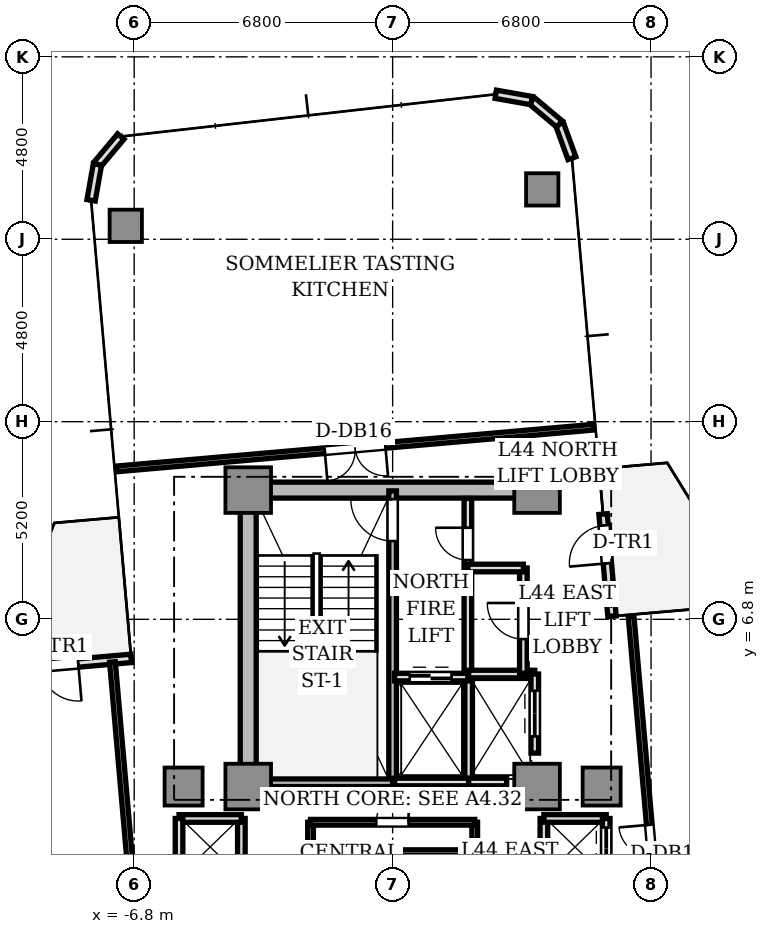
"""IFC4 building model, lengths in metres.
Left out: names, types, materials, properties, quantities, classifications, styles, units other than length and angle.
Written with IfcOpenShell. Run it as: python <this file> out.ifc"""

import sys

from ifc_helpers import new_model, si_unit, direction, frame, frame_2d, origin, origin_2d, place, context, subcontext, project, spatial, rectangle, extrude, source, transform, mapped, element, fill, save


model = new_model("IFC4")
c1 = context("Model", 3, precision=1e-05, world=origin(), true_north=direction((0.0, 1.0)))
c2 = subcontext(c1, "Body", "Model", "MODEL_VIEW")
j1 = project(units=[si_unit("LENGTHUNIT", "METRE"), si_unit("PLANEANGLEUNIT", "RADIAN")], contexts=[c1])
p1 = place(None, origin())
s1 = spatial("IfcSite", under=j1, at=p1, CompositionType="ELEMENT")
p2 = place(p1, origin())
s2 = spatial("IfcBuilding", under=s1, at=p2, CompositionType="ELEMENT")
p3 = place(p2, frame((0.0, 0.0, 160.65)))
s3 = spatial("IfcBuildingStorey", under=s2, at=p3, CompositionType="ELEMENT", Elevation=160.65)
p4 = place(p3, frame((-3.55, 10.2, 0.0), z_axis=(0.0, 0.0, 1.0), x_axis=(1.0, 0.0, 0.0)))
e1 = element("IfcWall", 1, at=p4, inside=s3, PredefinedType="SHEAR", context=c2, shape_type="SweptSolid", body=[
    extrude(rectangle(XDim=7.1, YDim=0.42, at=frame_2d((3.55, 0.0))), origin(), (0.0, 0.0, 1.0), 3.11),
])
p5 = place(p3, frame((-3.8, 2.85, 0.0), z_axis=(0.0, 0.0, 1.0), x_axis=(0.0, 1.0, 0.0)))
e2 = element("IfcWall", 2, at=p5, inside=s3, PredefinedType="SHEAR", context=c2, shape_type="SweptSolid", body=[
    extrude(rectangle(XDim=6.9, YDim=0.42, at=frame_2d((3.45, 0.0))), origin(), (0.0, 0.0, 1.0), 3.11),
])
m1 = source(origin(), c2, "Body", "SweptSolid", [
    extrude(rectangle(XDim=1.2, YDim=1.2, at=origin_2d()), origin(), (0.0, 0.0, 1.0), 3.11),
])
for number, where, z_axis, x_axis in (
    (3, (-3.8, 2.4, 0.0), (0.0, 0.0, 1.0), (1.0, 0.0, 0.0)),
    (4, (3.8, 2.4, 0.0), (0.0, 0.0, 1.0), (1.0, 0.0, 0.0)),
    (5, (-3.8, 10.2, 0.0), (0.0, 0.0, 1.0), (1.0, 0.0, 0.0)),
    (6, (3.8, 10.2, 0.0), (0.0, 0.0, 1.0), (1.0, 0.0, 0.0)),
):
    element("IfcColumn", number, at=place(p3, frame(where, z_axis=z_axis, x_axis=x_axis)), inside=s3, PredefinedType="COLUMN", context=c2, shape_type="MappedRepresentation", body=[
        mapped(m1, transform((0.0, 0.0, 0.0), scale=1.0)),
    ])
m2 = source(origin(), c2, "Body", "SweptSolid", [
    extrude(rectangle(XDim=1.0, YDim=1.0, at=origin_2d()), origin(), (0.0, 0.0, 1.0), 3.11),
])
for number, where, z_axis, x_axis in (
    (7, (5.5, 2.4, 0.0), (0.0, 0.0, 1.0), (1.0, 0.0, 0.0)),
    (8, (-5.5, 2.4, 0.0), (0.0, 0.0, 1.0), (1.0, 0.0, 0.0)),
):
    element("IfcColumn", number, at=place(p3, frame(where, z_axis=z_axis, x_axis=x_axis)), inside=s3, PredefinedType="COLUMN", context=c2, shape_type="MappedRepresentation", body=[
        mapped(m2, transform((0.0, 0.0, 0.0), scale=1.0)),
    ])
m3 = source(origin(), c2, "Body", "SweptSolid", [
    extrude(rectangle(XDim=0.85, YDim=0.85, at=origin_2d()), origin(), (0.0, 0.0, 1.0), 3.11),
])
for number, where, z_axis, x_axis in (
    (9, (3.936, 18.112, 0.0), (0.0, 0.0, 1.0), (1.0, 0.0, 0.0)),
    (10, (-7.022, 17.153, 0.0), (0.0, 0.0, 1.0), (1.0, 0.0, 0.0)),
):
    element("IfcColumn", number, at=place(p3, frame(where, z_axis=z_axis, x_axis=x_axis)), inside=s3, PredefinedType="COLUMN", context=c2, shape_type="MappedRepresentation", body=[
        mapped(m3, transform((0.0, 0.0, 0.0), scale=1.0)),
    ])
p6 = place(p3, frame((5.772, 6.879, 0.0), z_axis=(0.0, 0.0, 1.0), x_axis=(-0.087168071984, 0.996193619346, 0.0)))
e11 = element("IfcWall", 11, at=p6, inside=s3, PredefinedType="STANDARD", context=c2, shape_type="SweptSolid", body=[
    extrude(rectangle(XDim=2.7, YDim=0.22, at=frame_2d((1.35, 0.0))), origin(), (0.0, 0.0, 1.0), 3.11),
])
p7 = place(p6, frame((1.4, 0.0, 0.0)))
e12 = element("IfcOpeningElement", 12, at=p7, cuts=e11, PredefinedType="OPENING", context=c2, shape_type="SweptSolid", body=[
    extrude(rectangle(XDim=1.0, YDim=2.2, at=frame_2d((0.5, 1.1))), frame((0.0, 0.12, 0.0), z_axis=(0.0, -1.0, 0.0), x_axis=(1.0, 0.0, 0.0)), (0.0, 0.0, 1.0), 0.24),
])
p8 = place(p3, frame((4.718, 18.933, 0.0), z_axis=(0.0, 0.0, 1.0), x_axis=(-0.34188635151, 0.939741306239, 0.0)))
e13 = element("IfcWall", 13, at=p8, inside=s3, PredefinedType="STANDARD", context=c2, shape_type="SweptSolid", body=[
    extrude(rectangle(XDim=0.958, YDim=0.22, at=frame_2d((0.479, 0.0))), origin(), (0.0, 0.0, 1.0), 3.11),
])
for number, where, z_axis, x_axis in (
    (14, (4.39, 19.833, 0.0), (0.0, 0.0, 1.0), (-0.766, 0.643, 0.0)),
    (15, (3.657, 20.449, 0.0), (0.0, 0.0, 1.0), (-0.985, 0.174, 0.0)),
):
    element("IfcWall", number, at=place(p3, frame(where, z_axis=z_axis, x_axis=x_axis)), inside=s3, PredefinedType="STANDARD", context=c2, shape_type="SweptSolid", body=[
        extrude(rectangle(XDim=0.958, YDim=0.22, at=frame_2d((0.479, 0.0))), origin(), (0.0, 0.0, 1.0), 3.11),
    ])
for number, where, z_axis, x_axis in (
    (16, (-7.152, 19.503, 0.0), (0.0, 0.0, 1.0), (-0.643, -0.766, 0.0)),
    (17, (-7.768, 18.769, 0.0), (0.0, 0.0, 1.0), (-0.174, -0.985, 0.0)),
):
    element("IfcWall", number, at=place(p3, frame(where, z_axis=z_axis, x_axis=x_axis)), inside=s3, PredefinedType="STANDARD", context=c2, shape_type="SweptSolid", body=[
        extrude(rectangle(XDim=0.958, YDim=0.22, at=frame_2d((0.479, 0.0))), origin(), (0.0, 0.0, 1.0), 3.11),
    ])
p9 = place(p3, frame((-6.879, 5.772, 0.0), z_axis=(0.0, 0.0, 1.0), x_axis=(-0.996193619346, -0.087168071984, 0.0)))
e18 = element("IfcWall", 18, at=p9, inside=s3, PredefinedType="STANDARD", context=c2, shape_type="SweptSolid", body=[
    extrude(rectangle(XDim=2.7, YDim=0.22, at=frame_2d((1.35, 0.0))), origin(), (0.0, 0.0, 1.0), 3.11),
])
p10 = place(p9, frame((1.4, 0.0, 0.0)))
e19 = element("IfcOpeningElement", 19, at=p10, cuts=e18, PredefinedType="OPENING", context=c2, shape_type="SweptSolid", body=[
    extrude(rectangle(XDim=1.0, YDim=2.2, at=frame_2d((0.5, 1.1))), frame((0.0, 0.12, 0.0), z_axis=(0.0, -1.0, 0.0), x_axis=(1.0, 0.0, 0.0)), (0.0, 0.0, 1.0), 0.24),
])
p11 = place(p3, frame((0.0, 2.5, 0.0), z_axis=(0.0, 0.0, 1.0), x_axis=(0.0, 1.0, 0.0)))
e20 = element("IfcWall", 20, at=p11, inside=s3, PredefinedType="SOLIDWALL", context=c2, shape_type="SweptSolid", body=[
    extrude(rectangle(XDim=7.68, YDim=0.2, at=frame_2d((3.84, 0.0))), origin(), (0.0, 0.0, 1.0), 3.11),
])
p12 = place(p11, frame((6.36, 0.0, 0.0)))
e21 = element("IfcOpeningElement", 21, at=p12, cuts=e20, PredefinedType="OPENING", context=c2, shape_type="SweptSolid", body=[
    extrude(rectangle(XDim=1.1, YDim=2.15, at=frame_2d((0.55, 1.075))), frame((0.0, 0.11, 0.0), z_axis=(0.0, -1.0, 0.0), x_axis=(1.0, 0.0, 0.0)), (0.0, 0.0, 1.0), 0.22),
])
p13 = place(p3, frame((-3.72, 2.5, 0.0), z_axis=(0.0, 0.0, 1.0), x_axis=(1.0, 0.0, 0.0)))
e22 = element("IfcWall", 22, at=p13, inside=s3, PredefinedType="SOLIDWALL", context=c2, shape_type="SweptSolid", body=[
    extrude(rectangle(XDim=3.72, YDim=0.2, at=frame_2d((1.86, 0.0))), origin(), (0.0, 0.0, 1.0), 3.11),
])
p14 = place(p3, frame((1.98, 5.32, 0.0), z_axis=(0.0, 0.0, 1.0), x_axis=(0.0, 1.0, 0.0)))
e23 = element("IfcWall", 23, at=p14, inside=s3, PredefinedType="SOLIDWALL", context=c2, shape_type="SweptSolid", body=[
    extrude(rectangle(XDim=4.66, YDim=0.2, at=frame_2d((2.33, 0.0))), origin(), (0.0, 0.0, 1.0), 2.66),
])
p15 = place(p14, frame((3.04, 0.0, 0.0)))
e24 = element("IfcOpeningElement", 24, at=p15, cuts=e23, PredefinedType="OPENING", context=c2, shape_type="SweptSolid", body=[
    extrude(rectangle(XDim=0.85, YDim=2.1, at=frame_2d((0.425, 1.05))), frame((0.0, 0.11, 0.0), z_axis=(0.0, -1.0, 0.0), x_axis=(1.0, 0.0, 0.0)), (0.0, 0.0, 1.0), 0.22),
])
p16 = place(p3, frame((2.0, 2.5, 0.0), z_axis=(0.0, 0.0, 1.0), x_axis=(0.0, 1.0, 0.0)))
e25 = element("IfcWall", 25, at=p16, inside=s3, PredefinedType="SOLIDWALL", context=c2, shape_type="SweptSolid", body=[
    extrude(rectangle(XDim=2.78, YDim=0.2, at=frame_2d((1.39, 0.0))), origin(), (0.0, 0.0, 1.0), 2.66),
])
p17 = place(p3, frame((0.05, 2.52, 0.0), z_axis=(0.0, 0.0, 1.0), x_axis=(1.0, 0.0, 0.0)))
e26 = element("IfcWall", 26, at=p17, inside=s3, PredefinedType="SOLIDWALL", context=c2, shape_type="SweptSolid", body=[
    extrude(rectangle(XDim=1.95, YDim=0.2, at=frame_2d((0.975, 0.0))), origin(), (0.0, 0.0, 1.0), 2.66),
])
p18 = place(p3, frame((0.05, 5.28, 0.0), z_axis=(0.0, 0.0, 1.0), x_axis=(1.0, 0.0, 0.0)))
e27 = element("IfcWall", 27, at=p18, inside=s3, PredefinedType="SOLIDWALL", context=c2, shape_type="SweptSolid", body=[
    extrude(rectangle(XDim=1.93, YDim=0.2, at=frame_2d((0.965, 0.0))), origin(), (0.0, 0.0, 1.0), 2.66),
])
p19 = place(p18, frame((0.4, 0.0, 0.0)))
e28 = element("IfcOpeningElement", 28, at=p19, cuts=e27, PredefinedType="OPENING", context=c2, shape_type="SweptSolid", body=[
    extrude(rectangle(XDim=1.1, YDim=2.2, at=frame_2d((0.55, 1.1))), frame((0.0, 0.11, 0.0), z_axis=(0.0, -1.0, 0.0), x_axis=(1.0, 0.0, 0.0)), (0.0, 0.0, 1.0), 0.22),
])
p20 = place(p3, frame((2.0, 2.52, 0.0), z_axis=(0.0, 0.0, 1.0), x_axis=(1.0, 0.0, 0.0)))
e29 = element("IfcWall", 29, at=p20, inside=s3, PredefinedType="SOLIDWALL", context=c2, shape_type="SweptSolid", body=[
    extrude(rectangle(XDim=1.0, YDim=0.2, at=frame_2d((0.5, 0.0))), origin(), (0.0, 0.0, 1.0), 2.66),
])
p21 = place(p3, frame((2.0, 5.36, 0.0), z_axis=(0.0, 0.0, 1.0), x_axis=(1.0, 0.0, 0.0)))
e30 = element("IfcWall", 30, at=p21, inside=s3, PredefinedType="SOLIDWALL", context=c2, shape_type="SweptSolid", body=[
    extrude(rectangle(XDim=1.74, YDim=0.2, at=frame_2d((0.87, 0.0))), origin(), (0.0, 0.0, 1.0), 2.66),
])
p22 = place(p3, frame((3.74, 3.28, 0.0), z_axis=(0.0, 0.0, 1.0), x_axis=(0.0, 1.0, 0.0)))
e31 = element("IfcWall", 31, at=p22, inside=s3, PredefinedType="SOLIDWALL", context=c2, shape_type="SweptSolid", body=[
    extrude(rectangle(XDim=2.08, YDim=0.2, at=frame_2d((1.04, 0.0))), origin(), (0.0, 0.0, 1.0), 2.66),
])
p23 = place(p22, frame((0.44, 0.0, 0.0)))
e32 = element("IfcOpeningElement", 32, at=p23, cuts=e31, PredefinedType="OPENING", context=c2, shape_type="SweptSolid", body=[
    extrude(rectangle(XDim=1.2, YDim=2.2, at=frame_2d((0.6, 1.1))), frame((0.0, 0.11, 0.0), z_axis=(0.0, -1.0, 0.0), x_axis=(1.0, 0.0, 0.0)), (0.0, 0.0, 1.0), 0.22),
])
p24 = place(p3, frame((3.98, -1.56, 0.0), z_axis=(0.0, 0.0, 1.0), x_axis=(0.0, 1.0, 0.0)))
e33 = element("IfcWall", 33, at=p24, inside=s3, PredefinedType="SOLIDWALL", context=c2, shape_type="SweptSolid", body=[
    extrude(rectangle(XDim=3.12, YDim=0.2, at=frame_2d((1.56, 0.0))), origin(), (0.0, 0.0, 1.0), 2.28),
])
p25 = place(p3, frame((3.98, 1.56, 0.0), z_axis=(0.0, 0.0, 1.0), x_axis=(1.0, 0.0, 0.0)))
e34 = element("IfcWall", 34, at=p25, inside=s3, PredefinedType="SOLIDWALL", context=c2, shape_type="SweptSolid", body=[
    extrude(rectangle(XDim=1.64, YDim=0.2, at=frame_2d((0.82, 0.0))), origin(), (0.0, 0.0, 1.0), 2.66),
])
p26 = place(p3, frame((5.62, 0.0, 0.0), z_axis=(0.0, 0.0, 1.0), x_axis=(0.0, 1.0, 0.0)))
e35 = element("IfcWall", 35, at=p26, inside=s3, PredefinedType="SOLIDWALL", context=c2, shape_type="SweptSolid", body=[
    extrude(rectangle(XDim=1.56, YDim=0.2, at=frame_2d((0.78, 0.0))), origin(), (0.0, 0.0, 1.0), 2.66),
])
p27 = place(p26, frame((0.22, 0.0, 0.0)))
e36 = element("IfcOpeningElement", 36, at=p27, cuts=e35, PredefinedType="OPENING", context=c2, shape_type="SweptSolid", body=[
    extrude(rectangle(XDim=1.1, YDim=2.2, at=frame_2d((0.55, 1.1))), frame((0.0, 0.11, 0.0), z_axis=(0.0, -1.0, 0.0), x_axis=(1.0, 0.0, 0.0)), (0.0, 0.0, 1.0), 0.22),
])
p28 = place(p3, frame((-3.98, -1.56, 0.0), z_axis=(0.0, 0.0, 1.0), x_axis=(0.0, 1.0, 0.0)))
e37 = element("IfcWall", 37, at=p28, inside=s3, PredefinedType="SOLIDWALL", context=c2, shape_type="SweptSolid", body=[
    extrude(rectangle(XDim=3.12, YDim=0.2, at=frame_2d((1.56, 0.0))), origin(), (0.0, 0.0, 1.0), 2.28),
])
p29 = place(p3, frame((-5.62, 1.56, 0.0), z_axis=(0.0, 0.0, 1.0), x_axis=(1.0, 0.0, 0.0)))
e38 = element("IfcWall", 38, at=p29, inside=s3, PredefinedType="SOLIDWALL", context=c2, shape_type="SweptSolid", body=[
    extrude(rectangle(XDim=1.64, YDim=0.2, at=frame_2d((0.82, 0.0))), origin(), (0.0, 0.0, 1.0), 2.66),
])
p30 = place(p3, frame((-5.62, 0.0, 0.0), z_axis=(0.0, 0.0, 1.0), x_axis=(0.0, 1.0, 0.0)))
e39 = element("IfcWall", 39, at=p30, inside=s3, PredefinedType="SOLIDWALL", context=c2, shape_type="SweptSolid", body=[
    extrude(rectangle(XDim=1.56, YDim=0.2, at=frame_2d((0.78, 0.0))), origin(), (0.0, 0.0, 1.0), 2.66),
])
p31 = place(p3, frame((3.44, 5.38, 0.0), z_axis=(0.0, 0.0, 1.0), x_axis=(0.0, 1.0, 0.0)))
e40 = element("IfcWall", 40, at=p31, inside=s3, PredefinedType="SOLIDWALL", context=c2, shape_type="SweptSolid", body=[
    extrude(rectangle(XDim=2.77, YDim=0.2, at=frame_2d((1.385, 0.0))), origin(), (0.0, 0.0, 1.0), 2.66),
])
p32 = place(p31, frame((0.9, 0.0, 0.0)))
e41 = element("IfcOpeningElement", 41, at=p32, cuts=e40, PredefinedType="OPENING", context=c2, shape_type="SweptSolid", body=[
    extrude(rectangle(XDim=0.95, YDim=2.15, at=frame_2d((0.475, 1.075))), frame((0.0, 0.11, 0.0), z_axis=(0.0, -1.0, 0.0), x_axis=(1.0, 0.0, 0.0)), (0.0, 0.0, 1.0), 0.22),
])
p33 = place(p3, frame((1.98, 8.15, 0.0), z_axis=(0.0, 0.0, 1.0), x_axis=(1.0, 0.0, 0.0)))
e42 = element("IfcWall", 42, at=p33, inside=s3, PredefinedType="SOLIDWALL", context=c2, shape_type="SweptSolid", body=[
    extrude(rectangle(XDim=1.46, YDim=0.2, at=frame_2d((0.73, 0.0))), origin(), (0.0, 0.0, 1.0), 2.66),
])
p34 = place(p3, frame((2.16, -1.46, 0.0), z_axis=(0.0, 0.0, 1.0), x_axis=(0.0, 1.0, 0.0)))
e43 = element("IfcWall", 43, at=p34, inside=s3, PredefinedType="PARTITIONING", context=c2, shape_type="SweptSolid", body=[
    extrude(rectangle(XDim=2.92, YDim=0.15, at=frame_2d((1.46, 0.0))), origin(), (0.0, 0.0, 1.0), 2.66),
])
p35 = place(p34, frame((1.035, 0.0, 0.0)))
e44 = element("IfcOpeningElement", 44, at=p35, cuts=e43, PredefinedType="OPENING", context=c2, shape_type="SweptSolid", body=[
    extrude(rectangle(XDim=0.85, YDim=2.1, at=frame_2d((0.425, 1.05))), frame((0.0, 0.085, 0.0), z_axis=(0.0, -1.0, 0.0), x_axis=(1.0, 0.0, 0.0)), (0.0, 0.0, 1.0), 0.17),
])
p36 = place(p3, frame((-2.16, -1.46, 0.0), z_axis=(0.0, 0.0, 1.0), x_axis=(0.0, 1.0, 0.0)))
e45 = element("IfcWall", 45, at=p36, inside=s3, PredefinedType="PARTITIONING", context=c2, shape_type="SweptSolid", body=[
    extrude(rectangle(XDim=2.92, YDim=0.15, at=frame_2d((1.46, 0.0))), origin(), (0.0, 0.0, 1.0), 2.66),
])
p37 = place(p3, frame((-2.16, 1.46, 0.0), z_axis=(0.0, 0.0, 1.0), x_axis=(1.0, 0.0, 0.0)))
e46 = element("IfcWall", 46, at=p37, inside=s3, PredefinedType="PARTITIONING", context=c2, shape_type="SweptSolid", body=[
    extrude(rectangle(XDim=4.32, YDim=0.15, at=frame_2d((2.16, 0.0))), origin(), (0.0, 0.0, 1.0), 2.66),
])
p38 = place(p37, frame((1.73, 0.0, 0.0)))
e47 = element("IfcOpeningElement", 47, at=p38, cuts=e46, PredefinedType="OPENING", context=c2, shape_type="SweptSolid", body=[
    extrude(rectangle(XDim=0.85, YDim=2.1, at=frame_2d((0.425, 1.05))), frame((0.0, 0.085, 0.0), z_axis=(0.0, -1.0, 0.0), x_axis=(1.0, 0.0, 0.0)), (0.0, 0.0, 1.0), 0.17),
])
p39 = place(p3, frame((-2.16, 0.66, 0.0), z_axis=(0.0, 0.0, 1.0), x_axis=(1.0, 0.0, 0.0)))
e48 = element("IfcWall", 48, at=p39, inside=s3, PredefinedType="PARTITIONING", context=c2, shape_type="SweptSolid", body=[
    extrude(rectangle(XDim=4.32, YDim=0.15, at=frame_2d((2.16, 0.0))), origin(), (0.0, 0.0, 1.0), 2.66),
])
p40 = place(p3, frame((7.373, -5.679, 0.0), z_axis=(0.0, 0.0, 1.0), x_axis=(-0.087154691724, 0.996194790044, 0.0)))
e49 = element("IfcWall", 49, at=p40, inside=s3, PredefinedType="PARTITIONING", context=c2, shape_type="SweptSolid", body=[
    extrude(rectangle(XDim=12.6, YDim=0.15, at=frame_2d((6.3, 0.0))), origin(), (0.0, 0.0, 1.0), 2.66),
])
p41 = place(p40, frame((5.5, 0.0, 0.0)))
e50 = element("IfcOpeningElement", 50, at=p41, cuts=e49, PredefinedType="OPENING", context=c2, shape_type="SweptSolid", body=[
    extrude(rectangle(XDim=1.6, YDim=2.25, at=frame_2d((0.8, 1.125))), frame((0.0, 0.085, 0.0), z_axis=(0.0, -1.0, 0.0), x_axis=(1.0, 0.0, 0.0)), (0.0, 0.0, 1.0), 0.17),
])
p42 = place(p3, frame((5.287, 11.856, 0.0), z_axis=(0.0, 0.0, 1.0), x_axis=(-0.996194790044, -0.087154691724, 0.0)))
e51 = element("IfcWall", 51, at=p42, inside=s3, PredefinedType="PARTITIONING", context=c2, shape_type="SweptSolid", body=[
    extrude(rectangle(XDim=12.6, YDim=0.15, at=frame_2d((6.3, 0.0))), origin(), (0.0, 0.0, 1.0), 2.66),
])
p43 = place(p42, frame((5.5, 0.0, 0.0)))
e52 = element("IfcOpeningElement", 52, at=p43, cuts=e51, PredefinedType="OPENING", context=c2, shape_type="SweptSolid", body=[
    extrude(rectangle(XDim=1.6, YDim=2.25, at=frame_2d((0.8, 1.125))), frame((0.0, 0.085, 0.0), z_axis=(0.0, -1.0, 0.0), x_axis=(1.0, 0.0, 0.0)), (0.0, 0.0, 1.0), 0.17),
])
p44 = place(p3, frame((-7.373, 5.679, 0.0), z_axis=(0.0, 0.0, 1.0), x_axis=(0.087154691724, -0.996194790044, 0.0)))
e53 = element("IfcWall", 53, at=p44, inside=s3, PredefinedType="PARTITIONING", context=c2, shape_type="SweptSolid", body=[
    extrude(rectangle(XDim=12.6, YDim=0.15, at=frame_2d((6.3, 0.0))), origin(), (0.0, 0.0, 1.0), 2.66),
])
p45 = place(p44, frame((5.5, 0.0, 0.0)))
e54 = element("IfcOpeningElement", 54, at=p45, cuts=e53, PredefinedType="OPENING", context=c2, shape_type="SweptSolid", body=[
    extrude(rectangle(XDim=1.6, YDim=2.25, at=frame_2d((0.8, 1.125))), frame((0.0, 0.085, 0.0), z_axis=(0.0, -1.0, 0.0), x_axis=(1.0, 0.0, 0.0)), (0.0, 0.0, 1.0), 0.17),
])
m4 = source(origin(), c2, "Body", "SweptSolid", [
    extrude(rectangle(XDim=1.0, YDim=0.05, at=origin_2d()), origin(), (0.0, 0.0, 1.0), 2.2),
])
p46 = place(p7, frame((0.5, 0.0, 0.0)))
e55 = element("IfcDoor", 55, at=p46, inside=s3, OperationType="SINGLE_SWING_LEFT", PredefinedType="DOOR", context=c2, shape_type="MappedRepresentation", body=[
    mapped(m4, transform((0.0, 0.0, 0.0), scale=1.0)),
])
fill(e12, e55)
p47 = place(p10, frame((0.5, 0.0, 0.0)))
e56 = element("IfcDoor", 56, at=p47, inside=s3, OperationType="SINGLE_SWING_LEFT", PredefinedType="DOOR", context=c2, shape_type="MappedRepresentation", body=[
    mapped(m4, transform((0.0, 0.0, 0.0), scale=1.0)),
])
fill(e19, e56)
m5 = source(origin(), c2, "Body", "SweptSolid", [
    extrude(rectangle(XDim=1.1, YDim=0.05, at=origin_2d()), origin(), (0.0, 0.0, 1.0), 2.15),
])
p48 = place(p12, frame((0.55, 0.0, 0.0)))
e57 = element("IfcDoor", 57, at=p48, inside=s3, OperationType="SINGLE_SWING_RIGHT", PredefinedType="DOOR", context=c2, shape_type="MappedRepresentation", body=[
    mapped(m5, transform((0.0, 0.0, 0.0), scale=1.0)),
])
fill(e21, e57)
m6 = source(origin(), c2, "Body", "SweptSolid", [
    extrude(rectangle(XDim=0.85, YDim=0.05, at=origin_2d()), origin(), (0.0, 0.0, 1.0), 2.1),
])
p49 = place(p15, frame((0.425, 0.0, 0.0)))
e58 = element("IfcDoor", 58, at=p49, inside=s3, OperationType="SINGLE_SWING_RIGHT", PredefinedType="DOOR", context=c2, shape_type="MappedRepresentation", body=[
    mapped(m6, transform((0.0, 0.0, 0.0), scale=1.0)),
])
fill(e24, e58)
m7 = source(origin(), c2, "Body", "SweptSolid", [
    extrude(rectangle(XDim=1.1, YDim=0.05, at=origin_2d()), origin(), (0.0, 0.0, 1.0), 2.2),
])
p50 = place(p19, frame((0.55, 0.0, 0.0)))
e59 = element("IfcDoor", 59, at=p50, inside=s3, OperationType="DOUBLE_DOOR_SLIDING", PredefinedType="DOOR", context=c2, shape_type="MappedRepresentation", body=[
    mapped(m7, transform((0.0, 0.0, 0.0), scale=1.0)),
])
fill(e28, e59)
m8 = source(origin(), c2, "Body", "SweptSolid", [
    extrude(rectangle(XDim=1.2, YDim=0.05, at=origin_2d()), origin(), (0.0, 0.0, 1.0), 2.2),
])
p51 = place(p23, frame((0.6, 0.0, 0.0)))
e60 = element("IfcDoor", 60, at=p51, inside=s3, OperationType="DOUBLE_DOOR_SLIDING", PredefinedType="DOOR", context=c2, shape_type="MappedRepresentation", body=[
    mapped(m8, transform((0.0, 0.0, 0.0), scale=1.0)),
])
fill(e32, e60)
p52 = place(p27, frame((0.55, 0.0, 0.0)))
e61 = element("IfcDoor", 61, at=p52, inside=s3, OperationType="DOUBLE_DOOR_SLIDING", PredefinedType="DOOR", context=c2, shape_type="MappedRepresentation", body=[
    mapped(m7, transform((0.0, 0.0, 0.0), scale=1.0)),
])
fill(e36, e61)
m9 = source(origin(), c2, "Body", "SweptSolid", [
    extrude(rectangle(XDim=0.95, YDim=0.05, at=origin_2d()), origin(), (0.0, 0.0, 1.0), 2.15),
])
p53 = place(p32, frame((0.475, 0.0, 0.0)))
e62 = element("IfcDoor", 62, at=p53, inside=s3, OperationType="SINGLE_SWING_RIGHT", PredefinedType="DOOR", context=c2, shape_type="MappedRepresentation", body=[
    mapped(m9, transform((0.0, 0.0, 0.0), scale=1.0)),
])
fill(e41, e62)
p54 = place(p38, frame((0.425, 0.0, 0.0)))
e63 = element("IfcDoor", 63, at=p54, inside=s3, OperationType="SINGLE_SWING_RIGHT", PredefinedType="DOOR", context=c2, shape_type="MappedRepresentation", body=[
    mapped(m6, transform((0.0, 0.0, 0.0), scale=1.0)),
])
fill(e47, e63)
m10 = source(origin(), c2, "Body", "SweptSolid", [
    extrude(rectangle(XDim=1.6, YDim=0.05, at=origin_2d()), origin(), (0.0, 0.0, 1.0), 2.25),
])
p55 = place(p41, frame((0.8, 0.0, 0.0)))
e64 = element("IfcDoor", 64, at=p55, inside=s3, OperationType="DOUBLE_DOOR_SINGLE_SWING", PredefinedType="DOOR", context=c2, shape_type="MappedRepresentation", body=[
    mapped(m10, transform((0.0, 0.0, 0.0), scale=1.0)),
])
fill(e50, e64)
p56 = place(p43, frame((0.8, 0.0, 0.0)))
e65 = element("IfcDoor", 65, at=p56, inside=s3, OperationType="DOUBLE_DOOR_SINGLE_SWING", PredefinedType="DOOR", context=c2, shape_type="MappedRepresentation", body=[
    mapped(m10, transform((0.0, 0.0, 0.0), scale=1.0)),
])
fill(e52, e65)
save(model, sys.argv[1])
